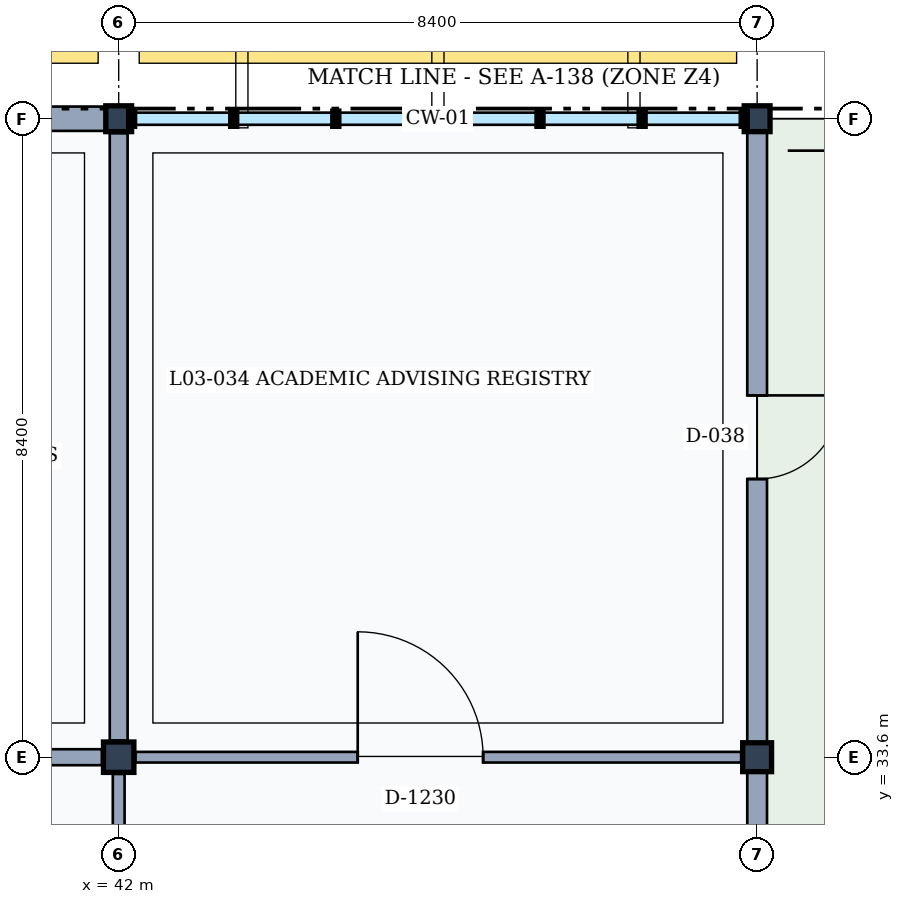
"""IFC4 building model, lengths in metres.
Left out: names, types, materials, properties, quantities, classifications, styles, units other than length and angle.
Written with IfcOpenShell. Run it as: python <this file> out.ifc"""

import sys

from ifc_helpers import new_model, si_unit, direction, frame, frame_2d, origin, origin_2d, place, context, subcontext, project, spatial, rectangle, extrude, element, fill, save


model = new_model("IFC4")
c1 = context("Model", 3, precision=1e-05, world=origin(), true_north=direction((0.0, 1.0)))
c2 = subcontext(c1, "Body", "Model", "MODEL_VIEW")
j1 = project(units=[si_unit("LENGTHUNIT", "METRE"), si_unit("PLANEANGLEUNIT", "RADIAN")], contexts=[c1])
p1 = place(None, origin())
s1 = spatial("IfcSite", under=j1, at=p1, CompositionType="ELEMENT")
p2 = place(p1, origin())
s2 = spatial("IfcBuilding", under=s1, at=p2, CompositionType="ELEMENT")
p3 = place(p2, frame((0.0, 0.0, 13.8)))
s3 = spatial("IfcBuildingStorey", under=s2, at=p3, CompositionType="ELEMENT", Elevation=13.8)
p4 = place(p3, frame((42.0, 33.6, 0.0), z_axis=(0.0, 0.0, 1.0), x_axis=(1.0, 0.0, 0.0)))
e1 = element("IfcColumn", 1, at=p4, inside=s3, PredefinedType="COLUMN", context=c2, shape_type="SweptSolid", body=[
    extrude(rectangle(XDim=0.4, YDim=0.4, at=origin_2d()), origin(), (0.0, 0.0, 1.0), 4.2),
])
p5 = place(p3, frame((42.0, 42.0, 0.0), z_axis=(0.0, 0.0, 1.0), x_axis=(1.0, 0.0, 0.0)))
e2 = element("IfcColumn", 2, at=p5, inside=s3, PredefinedType="COLUMN", context=c2, shape_type="SweptSolid", body=[
    extrude(rectangle(XDim=0.34, YDim=0.34, at=origin_2d()), origin(), (0.0, 0.0, 1.0), 4.2),
])
p6 = place(p3, frame((50.4, 33.6, 0.0), z_axis=(0.0, 0.0, 1.0), x_axis=(1.0, 0.0, 0.0)))
e3 = element("IfcColumn", 3, at=p6, inside=s3, PredefinedType="COLUMN", context=c2, shape_type="SweptSolid", body=[
    extrude(rectangle(XDim=0.38, YDim=0.38, at=origin_2d()), origin(), (0.0, 0.0, 1.0), 4.2),
])
p7 = place(p3, frame((50.4, 42.0, 0.0), z_axis=(0.0, 0.0, 1.0), x_axis=(1.0, 0.0, 0.0)))
e4 = element("IfcColumn", 4, at=p7, inside=s3, PredefinedType="COLUMN", context=c2, shape_type="SweptSolid", body=[
    extrude(rectangle(XDim=0.34, YDim=0.34, at=origin_2d()), origin(), (0.0, 0.0, 1.0), 4.2),
])
p8 = place(p3, frame((33.77, 42.0, 0.0), z_axis=(0.0, 0.0, 1.0), x_axis=(1.0, 0.0, 0.0)))
e5 = element("IfcWall", 5, at=p8, inside=s3, PredefinedType="SOLIDWALL", context=c2, shape_type="SweptSolid", body=[
    extrude(rectangle(XDim=8.06, YDim=0.32, at=frame_2d((4.03, 0.0))), origin(), (0.0, 0.0, 1.0), 3.36),
])
p9 = place(p8, frame((2.955, 0.0, 0.9)))
e6 = element("IfcOpeningElement", 6, at=p9, cuts=e5, PredefinedType="OPENING", context=c2, shape_type="SweptSolid", body=[
    extrude(rectangle(XDim=2.15, YDim=1.85, at=frame_2d((1.075, 0.925))), frame((0.0, 0.17, 0.0), z_axis=(0.0, -1.0, 0.0), x_axis=(1.0, 0.0, 0.0)), (0.0, 0.0, 1.0), 0.34),
])
p10 = place(p3, frame((50.4, 33.41, 0.0), z_axis=(0.0, 0.0, 1.0), x_axis=(0.0, -1.0, 0.0)))
e7 = element("IfcWall", 7, at=p10, inside=s3, PredefinedType="SOLIDWALL", context=c2, shape_type="SweptSolid", body=[
    extrude(rectangle(XDim=8.02, YDim=0.26, at=frame_2d((4.01, 0.0))), origin(), (0.0, 0.0, 1.0), 3.36),
])
p11 = place(p10, frame((3.46, 0.0, 0.0)))
e8 = element("IfcOpeningElement", 8, at=p11, cuts=e7, PredefinedType="OPENING", context=c2, shape_type="SweptSolid", body=[
    extrude(rectangle(XDim=1.1, YDim=2.2, at=frame_2d((0.55, 1.1))), frame((0.0, 0.14, 0.0), z_axis=(0.0, -1.0, 0.0), x_axis=(1.0, 0.0, 0.0)), (0.0, 0.0, 1.0), 0.28),
])
p12 = place(p3, frame((50.4, 41.83, 0.0), z_axis=(0.0, 0.0, 1.0), x_axis=(0.0, -1.0, 0.0)))
e9 = element("IfcWall", 9, at=p12, inside=s3, PredefinedType="SOLIDWALL", context=c2, shape_type="SweptSolid", body=[
    extrude(rectangle(XDim=8.04, YDim=0.26, at=frame_2d((4.02, 0.0))), origin(), (0.0, 0.0, 1.0), 3.36),
])
p13 = place(p12, frame((3.47, 0.0, 0.0)))
e10 = element("IfcOpeningElement", 10, at=p13, cuts=e9, PredefinedType="OPENING", context=c2, shape_type="SweptSolid", body=[
    extrude(rectangle(XDim=1.1, YDim=2.2, at=frame_2d((0.55, 1.1))), frame((0.0, 0.14, 0.0), z_axis=(0.0, -1.0, 0.0), x_axis=(1.0, 0.0, 0.0)), (0.0, 0.0, 1.0), 0.28),
])
p14 = place(p3, frame((42.0, 25.42, 0.0), z_axis=(0.0, 0.0, 1.0), x_axis=(0.0, 1.0, 0.0)))
e11 = element("IfcWall", 11, at=p14, inside=s3, PredefinedType="PARTITIONING", context=c2, shape_type="SweptSolid", body=[
    extrude(rectangle(XDim=7.96, YDim=0.155, at=frame_2d((3.98, 0.0))), origin(), (0.0, 0.0, 1.0), 3.32),
])
p15 = place(p3, frame((33.81, 33.6, 0.0), z_axis=(0.0, 0.0, 1.0), x_axis=(1.0, 0.0, 0.0)))
e12 = element("IfcWall", 12, at=p15, inside=s3, PredefinedType="PARTITIONING", context=c2, shape_type="SweptSolid", body=[
    extrude(rectangle(XDim=7.97, YDim=0.21, at=frame_2d((3.985, 0.0))), origin(), (0.0, 0.0, 1.0), 3.32),
])
p16 = place(p3, frame((42.0, 33.82, 0.0), z_axis=(0.0, 0.0, 1.0), x_axis=(0.0, 1.0, 0.0)))
e13 = element("IfcWall", 13, at=p16, inside=s3, PredefinedType="PARTITIONING", context=c2, shape_type="SweptSolid", body=[
    extrude(rectangle(XDim=7.99, YDim=0.235, at=frame_2d((3.995, 0.0))), origin(), (0.0, 0.0, 1.0), 3.32),
])
p17 = place(p3, frame((42.22, 33.6, 0.0), z_axis=(0.0, 0.0, 1.0), x_axis=(1.0, 0.0, 0.0)))
e14 = element("IfcWall", 14, at=p17, inside=s3, PredefinedType="PARTITIONING", context=c2, shape_type="SweptSolid", body=[
    extrude(rectangle(XDim=7.97, YDim=0.14, at=frame_2d((3.985, 0.0))), origin(), (0.0, 0.0, 1.0), 3.32),
])
p18 = place(p17, frame((2.925, 0.0, 0.0)))
e15 = element("IfcOpeningElement", 15, at=p18, cuts=e14, PredefinedType="OPENING", context=c2, shape_type="SweptSolid", body=[
    extrude(rectangle(XDim=1.65, YDim=2.25, at=frame_2d((0.825, 1.125))), frame((0.0, 0.08, 0.0), z_axis=(0.0, -1.0, 0.0), x_axis=(1.0, 0.0, 0.0)), (0.0, 0.0, 1.0), 0.16),
])
p19 = place(p13, origin())
e16 = element("IfcDoor", 16, at=p19, inside=s3, OperationType="SINGLE_SWING_LEFT", PredefinedType="DOOR", context=c2, shape_type="SweptSolid", body=[
    extrude(rectangle(XDim=1.1, YDim=2.2, at=frame_2d((0.55, 1.1))), frame((0.0, 0.025, 0.0), z_axis=(0.0, -1.0, 0.0), x_axis=(1.0, 0.0, 0.0)), (0.0, 0.0, 1.0), 0.05),
])
fill(e10, e16)
p20 = place(p18, origin())
e17 = element("IfcDoor", 17, at=p20, inside=s3, OperationType="SINGLE_SWING_LEFT", PredefinedType="DOOR", context=c2, shape_type="SweptSolid", body=[
    extrude(rectangle(XDim=1.65, YDim=2.25, at=frame_2d((0.825, 1.125))), frame((0.0, 0.025, 0.0), z_axis=(0.0, -1.0, 0.0), x_axis=(1.0, 0.0, 0.0)), (0.0, 0.0, 1.0), 0.05),
])
fill(e15, e17)
save(model, sys.argv[1])
